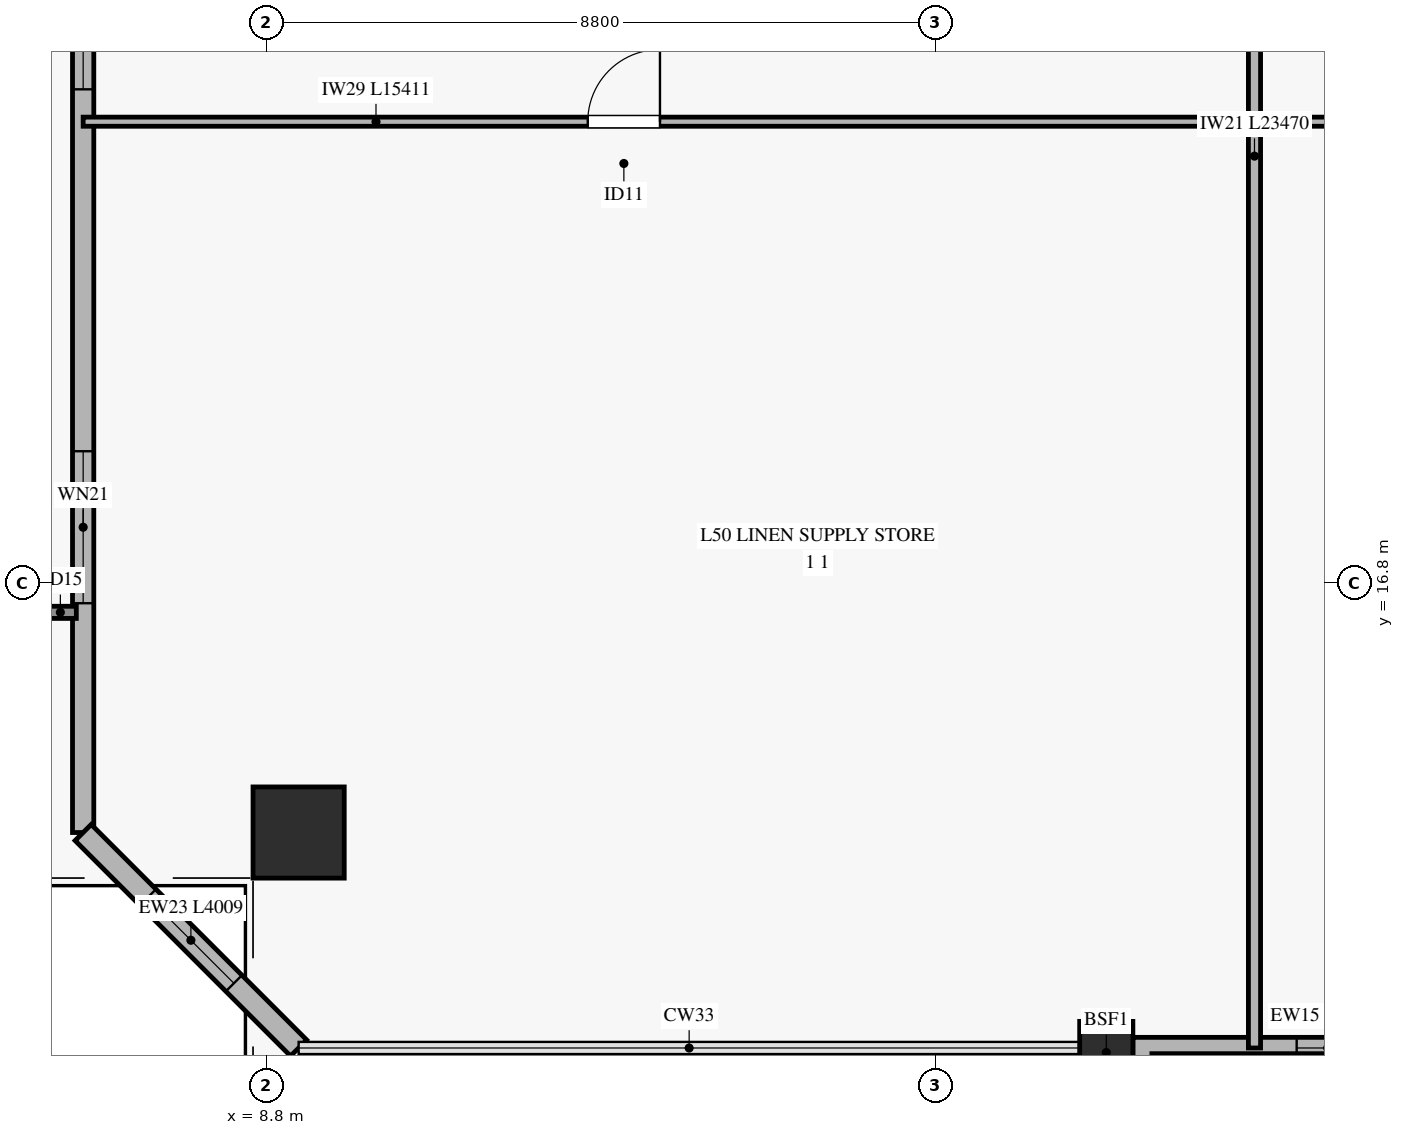
"""IFC4 building model, lengths in metres.
Left out: names, types, materials, properties, quantities, classifications, styles, units other than length and angle.
Written with IfcOpenShell. Run it as: python <this file> out.ifc"""

import sys

from ifc_helpers import new_model, si_unit, direction, frame, frame_2d, origin, origin_2d, place, context, subcontext, project, spatial, rectangle, hollow_rectangle, extrude, source, transform, mapped, element, fill, save


model = new_model("IFC4")
c1 = context("Model", 3, precision=1e-05, world=origin(), true_north=direction((0.0, 1.0)))
c2 = subcontext(c1, "Body", "Model", "MODEL_VIEW")
j1 = project(units=[si_unit("LENGTHUNIT", "METRE"), si_unit("PLANEANGLEUNIT", "RADIAN")], contexts=[c1])
p1 = place(None, origin())
s1 = spatial("IfcSite", under=j1, at=p1, CompositionType="ELEMENT")
p2 = place(p1, origin())
s2 = spatial("IfcBuilding", under=s1, at=p2, CompositionType="ELEMENT")
p3 = place(p2, frame((0.0, 0.0, 199.2)))
s3 = spatial("IfcBuildingStorey", under=s2, at=p3, CompositionType="ELEMENT", Elevation=199.2)
m1 = source(origin(), c2, "Body", "SweptSolid", [
    extrude(hollow_rectangle(XDim=1.2, YDim=1.2, WallThickness=0.055, at=origin_2d()), origin(), (0.0, 0.0, 1.0), 3.35),
])
p4 = place(p3, frame((9.224, 13.515, 0.0), z_axis=(0.083231287776, 0.200352723378, 0.976182021434), x_axis=(-0.923483899489, 0.383637181963, 0.0)))
e1 = element("IfcColumn", 1, at=p4, inside=s3, PredefinedType="COLUMN", context=c2, shape_type="MappedRepresentation", body=[
    mapped(m1, transform((0.0, 0.0, 0.0), x_axis=(1.0, 0.0, 0.0), y_axis=(0.0, 1.0, 0.0), z_axis=(0.0, 0.0, 1.0), scale=1.0)),
])
m2 = source(origin(), c2, "Body", "SweptSolid", [
    extrude(hollow_rectangle(XDim=0.7, YDim=0.7, WallThickness=0.032, at=origin_2d()), origin(), (0.0, 0.0, 1.0), 3.345),
])
p5 = place(p3, frame((19.85, 10.68, 0.0), z_axis=(0.0, 0.211053907144, 0.977474423338), x_axis=(-1.0, 0.0, 0.0)))
e2 = element("IfcColumn", 2, at=p5, inside=s3, PredefinedType="COLUMN", context=c2, shape_type="MappedRepresentation", body=[
    mapped(m2, transform((0.0, 0.0, 0.0), x_axis=(1.0, 0.0, 0.0), y_axis=(0.0, 1.0, 0.0), z_axis=(0.0, 0.0, 1.0), scale=1.0)),
])
p6 = place(p3, frame((20.2, 10.68, 0.0), z_axis=(0.0, 0.0, 1.0), x_axis=(1.0, 0.0, 0.0)))
e3 = element("IfcWall", 3, at=p6, inside=s3, PredefinedType="SOLIDWALL", context=c2, shape_type="SweptSolid", body=[
    extrude(rectangle(XDim=10.25, YDim=0.28, at=frame_2d((5.125, 0.0))), origin(), (0.0, 0.0, 1.0), 2.75),
])
p7 = place(p6, frame((4.2, 0.0, 0.0)))
e4 = element("IfcOpeningElement", 4, at=p7, cuts=e3, PredefinedType="OPENING", context=c2, shape_type="SweptSolid", body=[
    extrude(rectangle(XDim=1.8, YDim=2.25, at=frame_2d((0.9, 1.125))), frame((0.0, 0.15, 0.0), z_axis=(0.0, -1.0, 0.0), x_axis=(1.0, 0.0, 0.0)), (0.0, 0.0, 1.0), 0.3),
])
p8 = place(p6, frame((2.155, 0.0, 0.45)))
e5 = element("IfcOpeningElement", 5, at=p8, cuts=e3, PredefinedType="OPENING", context=c2, shape_type="SweptSolid", body=[
    extrude(rectangle(XDim=1.6, YDim=2.0, at=frame_2d((0.8, 1.0))), frame((0.0, 0.15, 0.0), z_axis=(0.0, -1.0, 0.0), x_axis=(1.0, 0.0, 0.0)), (0.0, 0.0, 1.0), 0.3),
])
p9 = place(p6, frame((8.22, 0.0, 0.45)))
e6 = element("IfcOpeningElement", 6, at=p9, cuts=e3, PredefinedType="OPENING", context=c2, shape_type="SweptSolid", body=[
    extrude(rectangle(XDim=1.6, YDim=2.0, at=frame_2d((0.8, 1.0))), frame((0.0, 0.15, 0.0), z_axis=(0.0, -1.0, 0.0), x_axis=(1.0, 0.0, 0.0)), (0.0, 0.0, 1.0), 0.3),
])
p10 = place(p3, frame((6.389, 13.515, 0.0), z_axis=(0.0, 0.0, 1.0), x_axis=(0.0, 1.0, 0.0)))
e7 = element("IfcWall", 7, at=p10, inside=s3, PredefinedType="SOLIDWALL", context=c2, shape_type="SweptSolid", body=[
    extrude(rectangle(XDim=14.525, YDim=0.28, at=frame_2d((7.263, 0.0))), origin(), (0.0, 0.0, 1.0), 2.75),
])
p11 = place(p10, frame((3.017, 0.0, 0.45)))
e8 = element("IfcOpeningElement", 8, at=p11, cuts=e7, PredefinedType="OPENING", context=c2, shape_type="SweptSolid", body=[
    extrude(rectangle(XDim=2.0, YDim=2.0, at=frame_2d((1.0, 1.0))), frame((0.0, 0.15, 0.0), z_axis=(0.0, -1.0, 0.0), x_axis=(1.0, 0.0, 0.0)), (0.0, 0.0, 1.0), 0.3),
])
p12 = place(p10, frame((9.779, 0.0, 0.45)))
e9 = element("IfcOpeningElement", 9, at=p12, cuts=e7, PredefinedType="OPENING", context=c2, shape_type="SweptSolid", body=[
    extrude(rectangle(XDim=2.0, YDim=2.0, at=frame_2d((1.0, 1.0))), frame((0.0, 0.15, 0.0), z_axis=(0.0, -1.0, 0.0), x_axis=(1.0, 0.0, 0.0)), (0.0, 0.0, 1.0), 0.3),
])
p13 = place(p3, frame((6.389, 13.515, 0.0), z_axis=(0.0, 0.0, 1.0), x_axis=(0.707137226464, -0.707076334599, 0.0)))
e10 = element("IfcWall", 10, at=p13, inside=s3, PredefinedType="SOLIDWALL", context=c2, shape_type="SweptSolid", body=[
    extrude(rectangle(XDim=4.01, YDim=0.3, at=frame_2d((2.005, 0.0))), origin(), (0.0, 0.0, 1.0), 2.75),
])
p14 = place(p13, frame((1.205, 0.0, 0.45)))
e11 = element("IfcOpeningElement", 11, at=p14, cuts=e10, PredefinedType="OPENING", context=c2, shape_type="SweptSolid", body=[
    extrude(rectangle(XDim=1.6, YDim=2.0, at=frame_2d((0.8, 1.0))), frame((0.0, 0.16, 0.0), z_axis=(0.0, -1.0, 0.0), x_axis=(1.0, 0.0, 0.0)), (0.0, 0.0, 1.0), 0.32),
])
p15 = place(p3, frame((6.389, 22.868, 0.0), z_axis=(0.0, 0.0, 1.0), x_axis=(1.0, 0.0, 0.0)))
e12 = element("IfcWall", 12, at=p15, inside=s3, PredefinedType="PARTITIONING", context=c2, shape_type="SweptSolid", body=[
    extrude(rectangle(XDim=15.411, YDim=0.12, at=frame_2d((7.706, 0.0))), origin(), (0.0, 0.0, 1.0), 2.455),
])
p16 = place(p15, frame((6.639, 0.0, 0.0)))
e13 = element("IfcOpeningElement", 13, at=p16, cuts=e12, PredefinedType="OPENING", context=c2, shape_type="SweptSolid", body=[
    extrude(rectangle(XDim=0.95, YDim=2.1, at=frame_2d((0.475, 1.05))), frame((0.0, 0.07, 0.0), z_axis=(0.0, -1.0, 0.0), x_axis=(1.0, 0.0, 0.0)), (0.0, 0.0, 1.0), 0.14),
])
p17 = place(p3, frame((21.8, 10.68, 0.0), z_axis=(0.0, 0.0, 1.0), x_axis=(0.0, 1.0, 0.0)))
e14 = element("IfcWall", 14, at=p17, inside=s3, PredefinedType="PARTITIONING", context=c2, shape_type="SweptSolid", body=[
    extrude(rectangle(XDim=23.47, YDim=0.16, at=frame_2d((11.735, 0.0))), origin(), (0.0, 0.0, 1.0), 2.755),
])
p18 = place(p3, frame((21.8, 22.868, 0.0), z_axis=(0.0, 0.0, 1.0), x_axis=(1.0, 0.0, 0.0)))
e15 = element("IfcWall", 15, at=p18, inside=s3, PredefinedType="PARTITIONING", context=c2, shape_type="SweptSolid", body=[
    extrude(rectangle(XDim=6.2, YDim=0.12, at=frame_2d((3.1, 0.0))), origin(), (0.0, 0.0, 1.0), 3.27),
])
p19 = place(p18, frame((2.646, 0.0, 0.0)))
e16 = element("IfcOpeningElement", 16, at=p19, cuts=e15, PredefinedType="OPENING", context=c2, shape_type="SweptSolid", body=[
    extrude(rectangle(XDim=0.95, YDim=2.1, at=frame_2d((0.475, 1.05))), frame((0.0, 0.07, 0.0), z_axis=(0.0, -1.0, 0.0), x_axis=(1.0, 0.0, 0.0)), (0.0, 0.0, 1.0), 0.14),
])
m3 = source(origin(), c2, "Body", "SweptSolid", [
    extrude(rectangle(XDim=1.6, YDim=2.0, at=frame_2d((0.8, 1.0))), frame((0.0, 0.03, 0.0), z_axis=(0.0, -1.0, 0.0), x_axis=(1.0, 0.0, 0.0)), (0.0, 0.0, 1.0), 0.06),
])
p20 = place(p8, origin())
e17 = element("IfcWindow", 17, at=p20, inside=s3, PartitioningType="SINGLE_PANEL", PredefinedType="WINDOW", context=c2, shape_type="MappedRepresentation", body=[
    mapped(m3, transform((0.0, 0.0, 0.0), x_axis=(1.0, 0.0, 0.0), y_axis=(0.0, 1.0, 0.0), z_axis=(0.0, 0.0, 1.0), scale=1.0)),
])
fill(e5, e17)
m4 = source(origin(), c2, "Body", "SweptSolid", [
    extrude(rectangle(XDim=2.0, YDim=2.0, at=frame_2d((1.0, 1.0))), frame((0.0, 0.03, 0.0), z_axis=(0.0, -1.0, 0.0), x_axis=(1.0, 0.0, 0.0)), (0.0, 0.0, 1.0), 0.06),
])
p21 = place(p11, origin())
e18 = element("IfcWindow", 18, at=p21, inside=s3, PartitioningType="SINGLE_PANEL", PredefinedType="WINDOW", context=c2, shape_type="MappedRepresentation", body=[
    mapped(m4, transform((0.0, 0.0, 0.0), x_axis=(1.0, 0.0, 0.0), y_axis=(0.0, 1.0, 0.0), z_axis=(0.0, 0.0, 1.0), scale=1.0)),
])
fill(e8, e18)
p22 = place(p12, origin())
e19 = element("IfcWindow", 19, at=p22, inside=s3, PartitioningType="SINGLE_PANEL", PredefinedType="WINDOW", context=c2, shape_type="MappedRepresentation", body=[
    mapped(m4, transform((0.0, 0.0, 0.0), x_axis=(1.0, 0.0, 0.0), y_axis=(0.0, 1.0, 0.0), z_axis=(0.0, 0.0, 1.0), scale=1.0)),
])
fill(e9, e19)
p23 = place(p14, origin())
e20 = element("IfcWindow", 20, at=p23, inside=s3, PartitioningType="SINGLE_PANEL", PredefinedType="WINDOW", context=c2, shape_type="MappedRepresentation", body=[
    mapped(m3, transform((0.0, 0.0, 0.0), x_axis=(1.0, 0.0, 0.0), y_axis=(0.0, 1.0, 0.0), z_axis=(0.0, 0.0, 1.0), scale=1.0)),
])
fill(e11, e20)
m5 = source(origin(), c2, "Body", "SweptSolid", [
    extrude(rectangle(XDim=0.95, YDim=2.1, at=frame_2d((0.475, 1.05))), frame((0.0, 0.025, 0.0), z_axis=(0.0, -1.0, 0.0), x_axis=(1.0, 0.0, 0.0)), (0.0, 0.0, 1.0), 0.05),
])
p24 = place(p16, origin())
e21 = element("IfcDoor", 21, at=p24, inside=s3, OperationType="SINGLE_SWING_RIGHT", PredefinedType="DOOR", context=c2, shape_type="MappedRepresentation", body=[
    mapped(m5, transform((0.0, 0.0, 0.0), x_axis=(1.0, 0.0, 0.0), y_axis=(0.0, 1.0, 0.0), z_axis=(0.0, 0.0, 1.0), scale=1.0)),
])
fill(e13, e21)
save(model, sys.argv[1])
